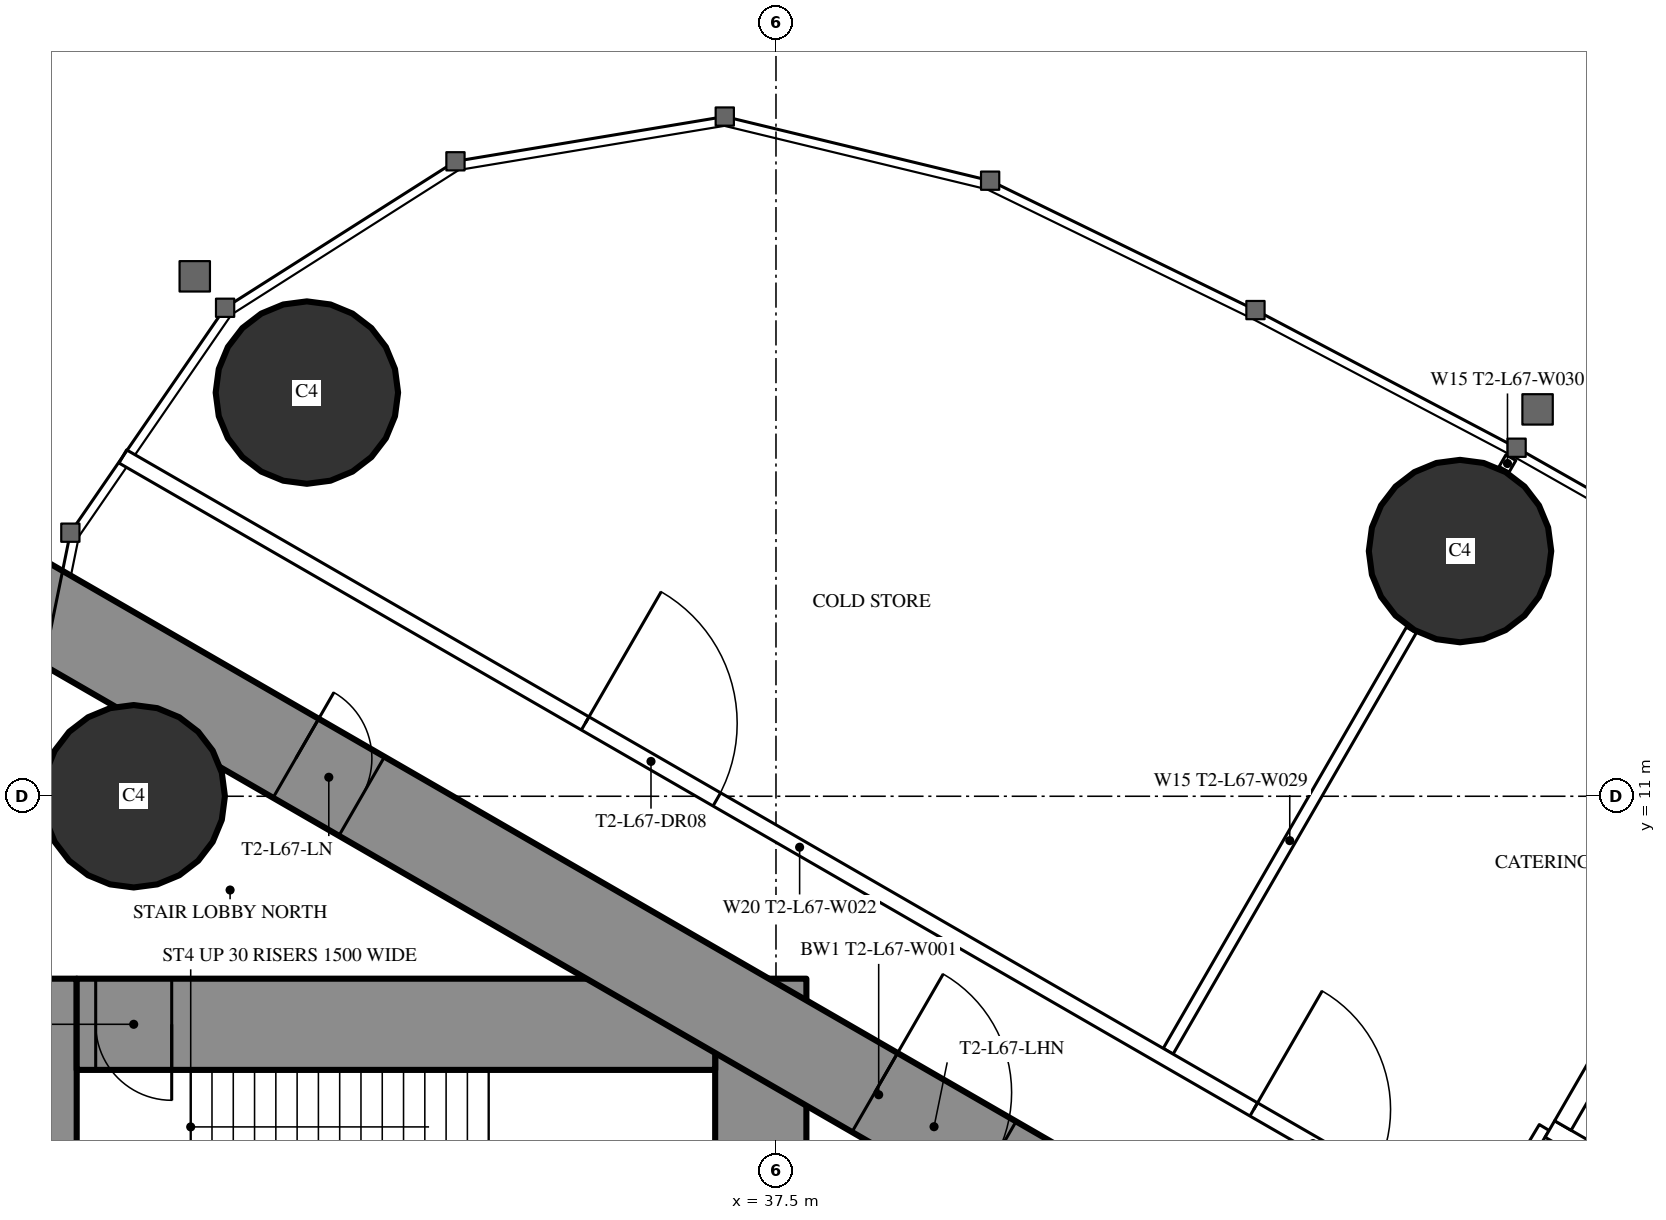
"""IFC4 building model, lengths in metres.
Left out: names, types, materials, properties, quantities, classifications, styles, units other than length and angle.
Written with IfcOpenShell. Run it as: python <this file> out.ifc"""

import sys

from ifc_helpers import new_model, si_unit, direction, frame, frame_2d, origin, origin_2d, place, context, subcontext, project, spatial, rectangle, circle, extrude, element, fill, save


model = new_model("IFC4")
c1 = context("Model", 3, precision=1e-05, world=origin(), true_north=direction((0.0, 1.0)))
c2 = subcontext(c1, "Body", "Model", "MODEL_VIEW")
j1 = project(units=[si_unit("LENGTHUNIT", "METRE"), si_unit("PLANEANGLEUNIT", "RADIAN")], contexts=[c1])
p1 = place(None, origin())
s1 = spatial("IfcSite", under=j1, at=p1, CompositionType="ELEMENT")
p2 = place(p1, origin())
s2 = spatial("IfcBuilding", under=s1, at=p2, CompositionType="ELEMENT")
p3 = place(p2, frame((0.0, 0.0, 251.9)))
s3 = spatial("IfcBuildingStorey", under=s2, at=p3, CompositionType="ELEMENT", Elevation=251.9)
for number, where, z_axis, x_axis in (
    (1, (31.328, 16.311, 0.0), (0.0, 0.0, 1.0), (1.0, 0.0, 0.0)),
    (2, (29.05, 11.0, 0.0), (0.0, 0.0, 1.0), (1.0, 0.0, 0.0)),
    (3, (46.499, 14.226, 0.0), (0.0, 0.0, 1.0), (1.0, 0.0, 0.0)),
):
    element("IfcColumn", number, at=place(p3, frame(where, z_axis=z_axis, x_axis=x_axis)), inside=s3, PredefinedType="COLUMN", context=c2, shape_type="SweptSolid", body=[
        extrude(circle(Radius=1.2, at=origin_2d()), origin(), (0.0, 0.0, 1.0), 5.4),
    ])
p4 = place(p3, frame((27.9, -8.6, 0.0), z_axis=(0.0, 0.0, 1.0), x_axis=(0.0, 1.0, 0.0)))
e4 = element("IfcWall", 4, at=p4, inside=s3, PredefinedType="SHEAR", context=c2, shape_type="SweptSolid", body=[
    extrude(rectangle(XDim=17.2, YDim=0.8, at=frame_2d((8.6, 0.0))), origin(), (0.0, 0.0, 1.0), 5.4),
])
p5 = place(p4, frame((9.35, 0.0, 0.0)))
e5 = element("IfcOpeningElement", 5, at=p5, cuts=e4, PredefinedType="OPENING", context=c2, shape_type="SweptSolid", body=[
    extrude(rectangle(XDim=0.9, YDim=2.2, at=frame_2d((0.45, 1.1))), frame((0.0, 0.41, 0.0), z_axis=(0.0, -1.0, 0.0), x_axis=(1.0, 0.0, 0.0)), (0.0, 0.0, 1.0), 0.82),
])
p6 = place(p3, frame((37.3, -8.6, 0.0), z_axis=(0.0, 0.0, 1.0), x_axis=(0.0, 1.0, 0.0)))
e6 = element("IfcWall", 6, at=p6, inside=s3, PredefinedType="SHEAR", context=c2, shape_type="SweptSolid", body=[
    extrude(rectangle(XDim=17.2, YDim=1.2, at=frame_2d((8.6, 0.0))), origin(), (0.0, 0.0, 1.0), 5.4),
])
p7 = place(p6, frame((7.7, 0.0, 0.0)))
e7 = element("IfcOpeningElement", 7, at=p7, cuts=e6, PredefinedType="OPENING", context=c2, shape_type="SweptSolid", body=[
    extrude(rectangle(XDim=1.8, YDim=2.2, at=frame_2d((0.9, 1.1))), frame((0.0, 0.61, 0.0), z_axis=(0.0, -1.0, 0.0), x_axis=(1.0, 0.0, 0.0)), (0.0, 0.0, 1.0), 1.22),
])
p8 = place(p3, frame((28.3, 8.0, 0.0), z_axis=(0.0, 0.0, 1.0), x_axis=(1.0, 0.0, 0.0)))
e8 = element("IfcWall", 8, at=p8, inside=s3, PredefinedType="SHEAR", context=c2, shape_type="SweptSolid", body=[
    extrude(rectangle(XDim=8.4, YDim=1.2, at=frame_2d((4.2, 0.0))), origin(), (0.0, 0.0, 1.0), 5.4),
])
p9 = place(p8, frame((0.25, 0.0, 0.0)))
e9 = element("IfcOpeningElement", 9, at=p9, cuts=e8, PredefinedType="OPENING", context=c2, shape_type="SweptSolid", body=[
    extrude(rectangle(XDim=1.0, YDim=2.2, at=frame_2d((0.5, 1.1))), frame((0.0, 0.61, 0.0), z_axis=(0.0, -1.0, 0.0), x_axis=(1.0, 0.0, 0.0)), (0.0, 0.0, 1.0), 1.22),
])
p10 = place(p3, frame((27.2, 13.8, 0.0), z_axis=(0.0, 0.0, 1.0), x_axis=(0.866024515034, -0.500001539357, 0.0)))
e10 = element("IfcWall", 10, at=p10, inside=s3, PredefinedType="SHEAR", context=c2, shape_type="SweptSolid", body=[
    extrude(rectangle(XDim=26.907, YDim=1.2, at=frame_2d((13.454, 0.0))), origin(), (0.0, 0.0, 1.0), 5.4),
])
p11 = place(p10, frame((4.6, 0.0, 0.0)))
e11 = element("IfcOpeningElement", 11, at=p11, cuts=e10, PredefinedType="OPENING", context=c2, shape_type="SweptSolid", body=[
    extrude(rectangle(XDim=1.0, YDim=2.2, at=frame_2d((0.5, 1.1))), frame((0.0, 0.61, 0.0), z_axis=(0.0, -1.0, 0.0), x_axis=(1.0, 0.0, 0.0)), (0.0, 0.0, 1.0), 1.22),
])
p12 = place(p10, frame((13.395, 0.0, 0.0)))
e12 = element("IfcOpeningElement", 12, at=p12, cuts=e10, PredefinedType="OPENING", context=c2, shape_type="SweptSolid", body=[
    extrude(rectangle(XDim=1.8, YDim=2.2, at=frame_2d((0.9, 1.1))), frame((0.0, 0.61, 0.0), z_axis=(0.0, -1.0, 0.0), x_axis=(1.0, 0.0, 0.0)), (0.0, 0.0, 1.0), 1.22),
])
p13 = place(p3, frame((42.66, 7.646, 0.0), z_axis=(0.0, 0.0, 1.0), x_axis=(0.499996592859, 0.866027370889, 0.0)))
e13 = element("IfcWall", 13, at=p13, inside=s3, PredefinedType="PARTITIONING", context=c2, shape_type="SweptSolid", body=[
    extrude(rectangle(XDim=6.398, YDim=0.15, at=frame_2d((3.199, 0.0))), origin(), (0.0, 0.0, 1.0), 4.25),
])
p14 = place(p3, frame((47.079, 15.3, 0.0), z_axis=(0.0, 0.0, 1.0), x_axis=(0.499212083968, 0.866479829667, 0.0)))
e14 = element("IfcWall", 14, at=p14, inside=s3, PredefinedType="PARTITIONING", context=c2, shape_type="SweptSolid", body=[
    extrude(rectangle(XDim=0.179, YDim=0.15, at=frame_2d((0.09, 0.0))), origin(), (0.0, 0.0, 1.0), 4.25),
])
p15 = place(p3, frame((28.907, 15.47, 0.0), z_axis=(0.0, 0.0, 1.0), x_axis=(0.866026627509, -0.499997880441, 0.0)))
e15 = element("IfcWall", 15, at=p15, inside=s3, PredefinedType="PARTITIONING", context=c2, shape_type="SweptSolid", body=[
    extrude(rectangle(XDim=20.563, YDim=0.2, at=frame_2d((10.282, 0.0))), origin(), (0.0, 0.0, 1.0), 5.15),
])
p16 = place(p15, frame((17.181, 0.0, 0.0)))
e16 = element("IfcOpeningElement", 16, at=p16, cuts=e15, PredefinedType="OPENING", context=c2, shape_type="SweptSolid", body=[
    extrude(rectangle(XDim=1.8, YDim=2.2, at=frame_2d((0.9, 1.1))), frame((0.0, 0.11, 0.0), z_axis=(0.0, -1.0, 0.0), x_axis=(1.0, 0.0, 0.0)), (0.0, 0.0, 1.0), 0.22),
])
p17 = place(p15, frame((7.024, 0.0, 0.0)))
e17 = element("IfcOpeningElement", 17, at=p17, cuts=e15, PredefinedType="OPENING", context=c2, shape_type="SweptSolid", body=[
    extrude(rectangle(XDim=2.0, YDim=2.4, at=frame_2d((1.0, 1.2))), frame((0.0, 0.11, 0.0), z_axis=(0.0, -1.0, 0.0), x_axis=(1.0, 0.0, 0.0)), (0.0, 0.0, 1.0), 0.22),
])
p18 = place(p3, frame((47.606, 6.642, 0.0), z_axis=(0.0, 0.0, 1.0), x_axis=(-0.51353662755, -0.858067673418, 0.0)))
e18 = element("IfcWall", 18, at=p18, inside=s3, PredefinedType="PARTITIONING", context=c2, shape_type="SweptSolid", body=[
    extrude(rectangle(XDim=1.91, YDim=0.15, at=frame_2d((0.955, 0.0))), origin(), (0.0, 0.0, 1.0), 5.15),
])
p19 = place(p3, frame((47.681, 6.622, 0.0), z_axis=(0.0, 0.0, 1.0), x_axis=(0.86603344179, -0.499986077507, 0.0)))
e19 = element("IfcWall", 19, at=p19, inside=s3, PredefinedType="PARTITIONING", context=c2, shape_type="SweptSolid", body=[
    extrude(rectangle(XDim=6.6, YDim=0.25, at=frame_2d((3.3, 0.0))), origin(), (0.0, 0.0, 1.0), 5.15),
])
p20 = place(p3, frame((47.852, 6.668, 0.0), z_axis=(0.0, 0.0, 1.0), x_axis=(0.499929347863, 0.866066190972, 0.0)))
e20 = element("IfcWall", 20, at=p20, inside=s3, PredefinedType="PARTITIONING", context=c2, shape_type="SweptSolid", body=[
    extrude(rectangle(XDim=3.201, YDim=0.25, at=frame_2d((1.6, 0.0))), origin(), (0.0, 0.0, 1.0), 5.15),
])
p21 = place(p16, origin())
e21 = element("IfcDoor", 21, at=p21, inside=s3, OperationType="DOUBLE_DOOR_SINGLE_SWING", PredefinedType="DOOR", context=c2, shape_type="SweptSolid", body=[
    extrude(rectangle(XDim=1.8, YDim=2.2, at=frame_2d((0.9, 1.1))), frame((0.0, 0.025, 0.0), z_axis=(0.0, -1.0, 0.0), x_axis=(1.0, 0.0, 0.0)), (0.0, 0.0, 1.0), 0.05),
])
fill(e16, e21)
p22 = place(p17, origin())
e22 = element("IfcDoor", 22, at=p22, inside=s3, OperationType="DOUBLE_DOOR_SINGLE_SWING", PredefinedType="DOOR", context=c2, shape_type="SweptSolid", body=[
    extrude(rectangle(XDim=2.0, YDim=2.4, at=frame_2d((1.0, 1.2))), frame((0.0, 0.025, 0.0), z_axis=(0.0, -1.0, 0.0), x_axis=(1.0, 0.0, 0.0)), (0.0, 0.0, 1.0), 0.05),
])
fill(e17, e22)
p23 = place(p11, origin())
e23 = element("IfcDoor", 23, at=p23, inside=s3, OperationType="SINGLE_SWING_LEFT", PredefinedType="DOOR", context=c2, shape_type="SweptSolid", body=[
    extrude(rectangle(XDim=1.0, YDim=2.2, at=frame_2d((0.5, 1.1))), frame((0.0, 0.025, 0.0), z_axis=(0.0, -1.0, 0.0), x_axis=(1.0, 0.0, 0.0)), (0.0, 0.0, 1.0), 0.05),
])
fill(e11, e23)
p24 = place(p12, origin())
e24 = element("IfcDoor", 24, at=p24, inside=s3, OperationType="DOUBLE_DOOR_SINGLE_SWING", PredefinedType="DOOR", context=c2, shape_type="SweptSolid", body=[
    extrude(rectangle(XDim=1.8, YDim=2.2, at=frame_2d((0.9, 1.1))), frame((0.0, 0.025, 0.0), z_axis=(0.0, -1.0, 0.0), x_axis=(1.0, 0.0, 0.0)), (0.0, 0.0, 1.0), 0.05),
])
fill(e12, e24)
p25 = place(p9, origin())
e25 = element("IfcDoor", 25, at=p25, inside=s3, OperationType="SINGLE_SWING_RIGHT", PredefinedType="DOOR", context=c2, shape_type="SweptSolid", body=[
    extrude(rectangle(XDim=1.0, YDim=2.2, at=frame_2d((0.5, 1.1))), frame((0.0, 0.025, 0.0), z_axis=(0.0, -1.0, 0.0), x_axis=(1.0, 0.0, 0.0)), (0.0, 0.0, 1.0), 0.05),
])
fill(e9, e25)
save(model, sys.argv[1])
